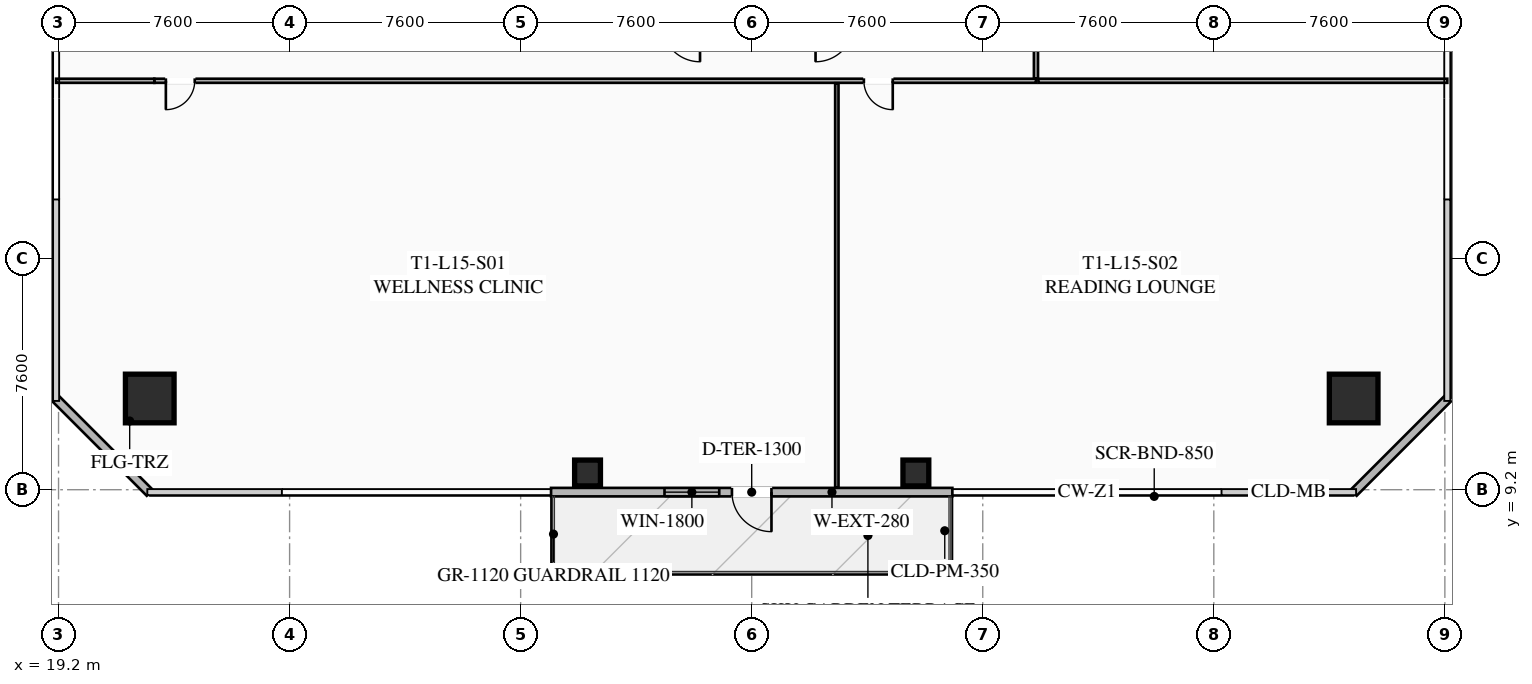
"""IFC4 building model, lengths in metres.
Left out: names, types, materials, properties, quantities, classifications, styles, units other than length and angle.
Written with IfcOpenShell. Run it as: python <this file> out.ifc"""

import sys

from ifc_helpers import new_model, si_unit, direction, frame, frame_2d, origin, origin_2d, place, context, subcontext, project, spatial, rectangle, hollow_rectangle, extrude, element, fill, save


model = new_model("IFC4")
c1 = context("Model", 3, precision=1e-05, world=origin(), true_north=direction((0.0, 1.0)))
c2 = subcontext(c1, "Body", "Model", "MODEL_VIEW")
j1 = project(units=[si_unit("LENGTHUNIT", "METRE"), si_unit("PLANEANGLEUNIT", "RADIAN")], contexts=[c1])
p1 = place(None, origin())
s1 = spatial("IfcSite", under=j1, at=p1, CompositionType="ELEMENT")
p2 = place(p1, origin())
s2 = spatial("IfcBuilding", under=s1, at=p2, CompositionType="ELEMENT")
p3 = place(p2, frame((0.0, 0.0, 60.1)))
s3 = spatial("IfcBuildingStorey", under=s2, at=p3, CompositionType="ELEMENT", Elevation=60.1)
for number, where, z_axis, x_axis in (
    (1, (22.2, 12.2, 0.0), (0.0, 0.0, 1.0), (1.0, 0.0, 0.0)),
    (2, (61.8, 12.2, 0.0), (0.0, 0.0, 1.0), (1.0, 0.0, 0.0)),
):
    element("IfcColumn", number, at=place(p3, frame(where, z_axis=z_axis, x_axis=x_axis)), inside=s3, PredefinedType="COLUMN", context=c2, shape_type="SweptSolid", body=[
        extrude(hollow_rectangle(XDim=1.6, YDim=1.6, WallThickness=0.06, at=origin_2d()), origin(), (0.0, 0.0, 1.0), 3.35),
    ])
for number, where, z_axis, x_axis in (
    (3, (36.6, 9.75, 0.0), (0.0, 0.0, 1.0), (1.0, 0.0, 0.0)),
    (4, (47.4, 9.75, 0.0), (0.0, 0.0, 1.0), (1.0, 0.0, 0.0)),
):
    element("IfcColumn", number, at=place(p3, frame(where, z_axis=z_axis, x_axis=x_axis)), inside=s3, PredefinedType="COLUMN", context=c2, shape_type="SweptSolid", body=[
        extrude(hollow_rectangle(XDim=0.85, YDim=0.85, WallThickness=0.035, at=origin_2d()), origin(), (0.0, 0.0, 1.0), 3.35),
    ])
p4 = place(p3, frame((48.6, 9.12, 0.0), z_axis=(0.0, 0.0, 1.0), x_axis=(-1.0, 0.0, 0.0)))
e5 = element("IfcWall", 5, at=p4, inside=s3, PredefinedType="SOLIDWALL", context=c2, shape_type="SweptSolid", body=[
    extrude(rectangle(XDim=13.2, YDim=0.28, at=frame_2d((6.6, 0.0))), origin(), (0.0, 0.0, 1.0), 3.35),
])
p5 = place(p4, frame((5.95, 0.0, 0.0)))
e6 = element("IfcOpeningElement", 6, at=p5, cuts=e5, PredefinedType="OPENING", context=c2, shape_type="SweptSolid", body=[
    extrude(rectangle(XDim=1.3, YDim=2.15, at=frame_2d((0.65, 1.075))), frame((0.0, 0.15, 0.0), z_axis=(0.0, -1.0, 0.0), x_axis=(1.0, 0.0, 0.0)), (0.0, 0.0, 1.0), 0.3),
])
p6 = place(p4, frame((7.668, 0.0, 0.85)))
e7 = element("IfcOpeningElement", 7, at=p6, cuts=e5, PredefinedType="OPENING", context=c2, shape_type="SweptSolid", body=[
    extrude(rectangle(XDim=1.8, YDim=1.92, at=frame_2d((0.9, 0.96))), frame((0.0, 0.15, 0.0), z_axis=(0.0, -1.0, 0.0), x_axis=(1.0, 0.0, 0.0)), (0.0, 0.0, 1.0), 0.3),
])
for number, where, z_axis, x_axis in (
    (8, (22.2, 9.1, 0.0), (0.0, 0.0, 1.0), (-0.707, 0.707, 0.0)),
    (9, (64.9, 12.2, 0.0), (0.0, 0.0, 1.0), (-0.707, -0.707, 0.0)),
):
    element("IfcWall", number, at=place(p3, frame(where, z_axis=z_axis, x_axis=x_axis)), inside=s3, PredefinedType="SOLIDWALL", context=c2, shape_type="SweptSolid", body=[
        extrude(rectangle(XDim=4.384, YDim=0.28, at=frame_2d((2.192, 0.0))), origin(), (0.0, 0.0, 1.0), 3.35),
    ])
p7 = place(p3, frame((51.35, 22.65, 0.0), z_axis=(0.0, 0.0, 1.0), x_axis=(-1.0, 0.0, 0.0)))
e10 = element("IfcWall", 10, at=p7, inside=s3, PredefinedType="PARTITIONING", context=c2, shape_type="SweptSolid", body=[
    extrude(rectangle(XDim=29.0, YDim=0.135, at=frame_2d((14.5, 0.0))), origin(), (0.0, 0.0, 1.0), 2.703),
])
p8 = place(p7, frame((27.67, 0.0, 0.0)))
e11 = element("IfcOpeningElement", 11, at=p8, cuts=e10, PredefinedType="OPENING", context=c2, shape_type="SweptSolid", body=[
    extrude(rectangle(XDim=0.95, YDim=2.05, at=frame_2d((0.475, 1.025))), frame((0.0, 0.077, 0.0), z_axis=(0.0, -1.0, 0.0), x_axis=(1.0, 0.0, 0.0)), (0.0, 0.0, 1.0), 0.155),
])
p9 = place(p7, frame((4.71, 0.0, 0.0)))
e12 = element("IfcOpeningElement", 12, at=p9, cuts=e10, PredefinedType="OPENING", context=c2, shape_type="SweptSolid", body=[
    extrude(rectangle(XDim=0.95, YDim=2.05, at=frame_2d((0.475, 1.025))), frame((0.0, 0.077, 0.0), z_axis=(0.0, -1.0, 0.0), x_axis=(1.0, 0.0, 0.0)), (0.0, 0.0, 1.0), 0.155),
])
p10 = place(p3, frame((19.12, 22.65, 0.0), z_axis=(0.0, 0.0, 1.0), x_axis=(1.0, 0.0, 0.0)))
e13 = element("IfcWall", 13, at=p10, inside=s3, PredefinedType="PARTITIONING", context=c2, shape_type="SweptSolid", body=[
    extrude(rectangle(XDim=3.23, YDim=0.135, at=frame_2d((1.615, 0.0))), origin(), (0.0, 0.0, 1.0), 2.703),
])
p11 = place(p3, frame((44.8, 9.27, 0.0), z_axis=(0.0, 0.0, 1.0), x_axis=(0.0, 1.0, 0.0)))
e14 = element("IfcWall", 14, at=p11, inside=s3, PredefinedType="PARTITIONING", context=c2, shape_type="SweptSolid", body=[
    extrude(rectangle(XDim=13.3, YDim=0.11, at=frame_2d((6.65, 0.0))), origin(), (0.0, 0.0, 1.0), 2.703),
])
p12 = place(p3, frame((51.35, 41.59, 0.0), z_axis=(0.0, 0.0, 1.0), x_axis=(0.0, -1.0, 0.0)))
e15 = element("IfcWall", 15, at=p12, inside=s3, PredefinedType="PARTITIONING", context=c2, shape_type="SweptSolid", body=[
    extrude(rectangle(XDim=18.86, YDim=0.135, at=frame_2d((9.43, 0.0))), origin(), (0.0, 0.0, 1.0), 2.703),
])
p13 = place(p12, frame((8.83, 0.0, 0.0)))
e16 = element("IfcOpeningElement", 16, at=p13, cuts=e15, PredefinedType="OPENING", context=c2, shape_type="SweptSolid", body=[
    extrude(rectangle(XDim=0.95, YDim=2.05, at=frame_2d((0.475, 1.025))), frame((0.0, 0.077, 0.0), z_axis=(0.0, -1.0, 0.0), x_axis=(1.0, 0.0, 0.0)), (0.0, 0.0, 1.0), 0.155),
])
p14 = place(p3, frame((51.43, 22.65, 0.0), z_axis=(0.0, 0.0, 1.0), x_axis=(1.0, 0.0, 0.0)))
e17 = element("IfcWall", 17, at=p14, inside=s3, PredefinedType="PARTITIONING", context=c2, shape_type="SweptSolid", body=[
    extrude(rectangle(XDim=13.45, YDim=0.135, at=frame_2d((6.725, 0.0))), origin(), (0.0, 0.0, 1.0), 2.703),
])
p15 = place(p5, origin())
e18 = element("IfcDoor", 18, at=p15, inside=s3, OperationType="SINGLE_SWING_LEFT", PredefinedType="DOOR", context=c2, shape_type="SweptSolid", body=[
    extrude(rectangle(XDim=1.3, YDim=2.15, at=frame_2d((0.65, 1.075))), frame((0.0, 0.025, 0.0), z_axis=(0.0, -1.0, 0.0), x_axis=(1.0, 0.0, 0.0)), (0.0, 0.0, 1.0), 0.05),
])
fill(e6, e18)
p16 = place(p6, origin())
e19 = element("IfcWindow", 19, at=p16, inside=s3, PartitioningType="SINGLE_PANEL", PredefinedType="WINDOW", context=c2, shape_type="SweptSolid", body=[
    extrude(rectangle(XDim=1.8, YDim=1.92, at=frame_2d((0.9, 0.96))), frame((0.0, 0.03, 0.0), z_axis=(0.0, -1.0, 0.0), x_axis=(1.0, 0.0, 0.0)), (0.0, 0.0, 1.0), 0.06),
])
fill(e7, e19)
p17 = place(p8, origin())
e20 = element("IfcDoor", 20, at=p17, inside=s3, OperationType="SINGLE_SWING_RIGHT", PredefinedType="DOOR", context=c2, shape_type="SweptSolid", body=[
    extrude(rectangle(XDim=0.95, YDim=2.05, at=frame_2d((0.475, 1.025))), frame((0.0, 0.025, 0.0), z_axis=(0.0, -1.0, 0.0), x_axis=(1.0, 0.0, 0.0)), (0.0, 0.0, 1.0), 0.05),
])
fill(e11, e20)
p18 = place(p9, origin())
e21 = element("IfcDoor", 21, at=p18, inside=s3, OperationType="SINGLE_SWING_LEFT", PredefinedType="DOOR", context=c2, shape_type="SweptSolid", body=[
    extrude(rectangle(XDim=0.95, YDim=2.05, at=frame_2d((0.475, 1.025))), frame((0.0, 0.025, 0.0), z_axis=(0.0, -1.0, 0.0), x_axis=(1.0, 0.0, 0.0)), (0.0, 0.0, 1.0), 0.05),
])
fill(e12, e21)
save(model, sys.argv[1])
